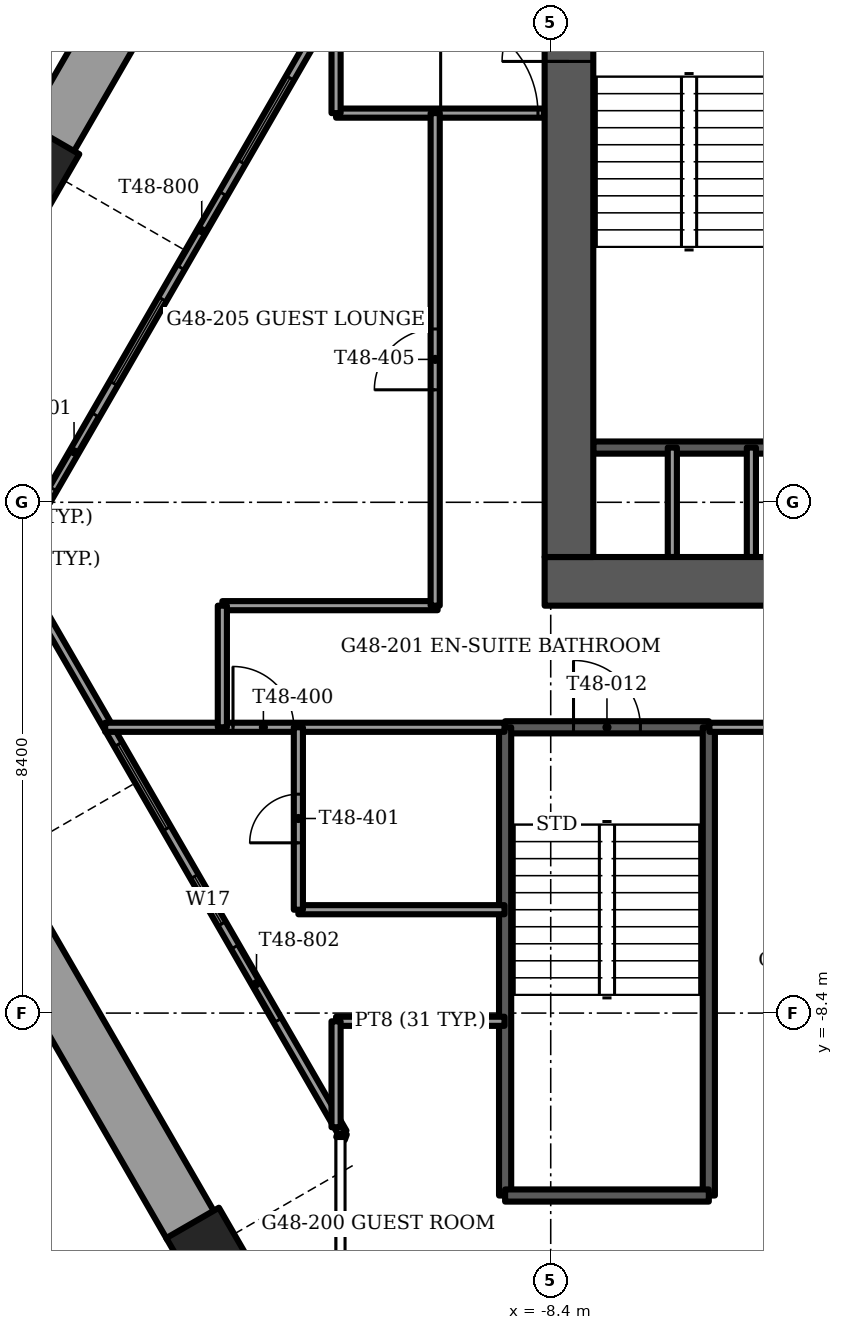
"""IFC4 building model, lengths in metres.
Left out: names, types, materials, properties, quantities, classifications, styles, units other than length and angle.
Written with IfcOpenShell. Run it as: python <this file> out.ifc"""

import sys

from ifc_helpers import new_model, si_unit, direction, frame, frame_2d, origin, origin_2d, place, context, subcontext, project, spatial, rectangle, extrude, element, fill, save


model = new_model("IFC4")
c1 = context("Model", 3, precision=1e-05, world=origin(), true_north=direction((0.0, 1.0)))
c2 = subcontext(c1, "Body", "Model", "MODEL_VIEW")
j1 = project(units=[si_unit("LENGTHUNIT", "METRE"), si_unit("PLANEANGLEUNIT", "RADIAN")], contexts=[c1])
p1 = place(None, origin())
s1 = spatial("IfcSite", under=j1, at=p1, CompositionType="ELEMENT")
p2 = place(p1, origin())
s2 = spatial("IfcBuilding", under=s1, at=p2, CompositionType="ELEMENT")
p3 = place(p2, frame((0.0, 0.0, 194.5)))
s3 = spatial("IfcBuildingStorey", under=s2, at=p3, CompositionType="ELEMENT", Elevation=194.5)
for number, where, z_axis, x_axis in (
    (1, (-16.835, 5.542, -1.2), (0.0, 0.0, 1.0), (0.5, 0.866, 0.0)),
    (2, (-14.039, -12.283, -1.2), (0.0, 0.0, 1.0), (-0.5, 0.866, 0.0)),
):
    element("IfcColumn", number, at=place(p3, frame(where, z_axis=z_axis, x_axis=x_axis)), inside=s3, PredefinedType="COLUMN", context=c2, shape_type="SweptSolid", body=[
        extrude(rectangle(XDim=1.0, YDim=1.0, at=origin_2d()), origin(), (0.0, 0.0, 1.0), 3.75),
    ])
p4 = place(p3, frame((-8.5, -1.3, -0.3), z_axis=(0.0, 0.0, 1.0), x_axis=(1.0, 0.0, 0.0)))
e3 = element("IfcWall", 3, at=p4, inside=s3, PredefinedType="SHEAR", context=c2, shape_type="SweptSolid", body=[
    extrude(rectangle(XDim=17.0, YDim=0.8, at=frame_2d((8.5, 0.0))), origin(), (0.0, 0.0, 1.0), 3.75),
])
p5 = place(p4, frame((7.7, 0.0, 0.0)))
e4 = element("IfcOpeningElement", 4, at=p5, cuts=e3, PredefinedType="OPENING", context=c2, shape_type="SweptSolid", body=[
    extrude(rectangle(XDim=1.6, YDim=2.1, at=frame_2d((0.8, 1.05))), frame((0.0, 0.4, 0.0), z_axis=(0.0, -1.0, 0.0), x_axis=(1.0, 0.0, 0.0)), (0.0, 0.0, 1.0), 0.8),
])
p6 = place(p3, frame((-8.1, -0.9, -0.3), z_axis=(0.0, 0.0, 1.0), x_axis=(0.0, 1.0, 0.0)))
e5 = element("IfcWall", 5, at=p6, inside=s3, PredefinedType="SHEAR", context=c2, shape_type="SweptSolid", body=[
    extrude(rectangle(XDim=9.8, YDim=0.8, at=frame_2d((4.9, 0.0))), origin(), (0.0, 0.0, 1.0), 3.75),
])
p7 = place(p6, frame((8.15, 0.0, 0.0)))
e6 = element("IfcOpeningElement", 6, at=p7, cuts=e5, PredefinedType="OPENING", context=c2, shape_type="SweptSolid", body=[
    extrude(rectangle(XDim=1.1, YDim=2.1, at=frame_2d((0.55, 1.05))), frame((0.0, 0.4, 0.0), z_axis=(0.0, -1.0, 0.0), x_axis=(1.0, 0.0, 0.0)), (0.0, 0.0, 1.0), 0.8),
])
for number, where, z_axis, x_axis in (
    (7, (-13.496, 11.427, 0.0), (0.0, 0.0, 1.0), (-0.5, -0.866, 0.0)),
    (8, (-17.466, -6.449, 0.0), (0.0, 0.0, 1.0), (0.5, -0.866, 0.0)),
):
    element("IfcWall", number, at=place(p3, frame(where, z_axis=z_axis, x_axis=x_axis)), inside=s3, PredefinedType="PARAPET", context=c2, shape_type="SweptSolid", body=[
        extrude(rectangle(XDim=6.296, YDim=0.9, at=frame_2d((3.148, 0.0))), origin(), (0.0, 0.0, 1.0), 1.1),
    ])
p8 = place(p3, frame((-11.824, 8.472, 0.0), z_axis=(0.0, 0.0, 1.0), x_axis=(-0.499996992154, -0.866027140358, 0.0)))
e9 = element("IfcWall", 9, at=p8, inside=s3, PredefinedType="SOLIDWALL", context=c2, shape_type="SweptSolid", body=[
    extrude(rectangle(XDim=10.264, YDim=0.15, at=frame_2d((5.132, 0.0))), origin(), (0.0, 0.0, 1.0), 3.45),
])
p9 = place(p8, frame((1.725, 0.0, 0.15)))
e10 = element("IfcOpeningElement", 10, at=p9, cuts=e9, PredefinedType="OPENING", context=c2, shape_type="SweptSolid", body=[
    extrude(rectangle(XDim=1.6, YDim=2.2, at=frame_2d((0.8, 1.1))), frame((0.0, 0.075, 0.0), z_axis=(0.0, -1.0, 0.0), x_axis=(1.0, 0.0, 0.0)), (0.0, 0.0, 1.0), 0.15),
])
p10 = place(p8, frame((3.925, 0.0, 0.0)))
e11 = element("IfcOpeningElement", 11, at=p10, cuts=e9, PredefinedType="OPENING", context=c2, shape_type="SweptSolid", body=[
    extrude(rectangle(XDim=1.4, YDim=2.4, at=frame_2d((0.7, 1.2))), frame((0.0, 0.075, 0.0), z_axis=(0.0, -1.0, 0.0), x_axis=(1.0, 0.0, 0.0)), (0.0, 0.0, 1.0), 0.15),
])
p11 = place(p8, frame((5.925, 0.0, 0.15)))
e12 = element("IfcOpeningElement", 12, at=p11, cuts=e9, PredefinedType="OPENING", context=c2, shape_type="SweptSolid", body=[
    extrude(rectangle(XDim=1.6, YDim=2.2, at=frame_2d((0.8, 1.1))), frame((0.0, 0.075, 0.0), z_axis=(0.0, -1.0, 0.0), x_axis=(1.0, 0.0, 0.0)), (0.0, 0.0, 1.0), 0.15),
])
p12 = place(p8, frame((8.125, 0.0, 0.0)))
e13 = element("IfcOpeningElement", 13, at=p12, cuts=e9, PredefinedType="OPENING", context=c2, shape_type="SweptSolid", body=[
    extrude(rectangle(XDim=1.4, YDim=2.4, at=frame_2d((0.7, 1.2))), frame((0.0, 0.075, 0.0), z_axis=(0.0, -1.0, 0.0), x_axis=(1.0, 0.0, 0.0)), (0.0, 0.0, 1.0), 0.15),
])
p13 = place(p3, frame((-16.956, -1.482, 0.0), z_axis=(0.0, 0.0, 1.0), x_axis=(0.499996992154, -0.866027140358, 0.0)))
e14 = element("IfcWall", 14, at=p13, inside=s3, PredefinedType="SOLIDWALL", context=c2, shape_type="SweptSolid", body=[
    extrude(rectangle(XDim=10.264, YDim=0.15, at=frame_2d((5.132, 0.0))), origin(), (0.0, 0.0, 1.0), 3.45),
])
p14 = place(p13, frame((2.885, 0.0, 0.15)))
e15 = element("IfcOpeningElement", 15, at=p14, cuts=e14, PredefinedType="OPENING", context=c2, shape_type="SweptSolid", body=[
    extrude(rectangle(XDim=1.6, YDim=2.2, at=frame_2d((0.8, 1.1))), frame((0.0, 0.075, 0.0), z_axis=(0.0, -1.0, 0.0), x_axis=(1.0, 0.0, 0.0)), (0.0, 0.0, 1.0), 0.15),
])
p15 = place(p13, frame((5.395, 0.0, 0.15)))
e16 = element("IfcOpeningElement", 16, at=p15, cuts=e14, PredefinedType="OPENING", context=c2, shape_type="SweptSolid", body=[
    extrude(rectangle(XDim=0.9, YDim=2.2, at=frame_2d((0.45, 1.1))), frame((0.0, 0.075, 0.0), z_axis=(0.0, -1.0, 0.0), x_axis=(1.0, 0.0, 0.0)), (0.0, 0.0, 1.0), 0.15),
])
p16 = place(p13, frame((6.73, 0.0, 0.0)))
e17 = element("IfcOpeningElement", 17, at=p16, cuts=e14, PredefinedType="OPENING", context=c2, shape_type="SweptSolid", body=[
    extrude(rectangle(XDim=1.4, YDim=2.4, at=frame_2d((0.7, 1.2))), frame((0.0, 0.075, 0.0), z_axis=(0.0, -1.0, 0.0), x_axis=(1.0, 0.0, 0.0)), (0.0, 0.0, 1.0), 0.15),
])
p17 = place(p3, frame((-11.824, -10.37, 0.0), z_axis=(0.0, 0.0, 1.0), x_axis=(-0.338543167143, -0.940950861619, 0.0)))
e18 = element("IfcWall", 18, at=p17, inside=s3, PredefinedType="SOLIDWALL", context=c2, shape_type="SweptSolid", body=[
    extrude(rectangle(XDim=0.098, YDim=0.15, at=frame_2d((0.049, 0.0))), origin(), (0.0, 0.0, 1.0), 3.45),
])
p18 = place(p3, frame((-7.7, 0.9, -0.3), z_axis=(0.0, 0.0, 1.0), x_axis=(1.0, 0.0, 0.0)))
e19 = element("IfcWall", 19, at=p18, inside=s3, PredefinedType="SOLIDWALL", context=c2, shape_type="SweptSolid", body=[
    extrude(rectangle(XDim=3.25, YDim=0.2, at=frame_2d((1.625, 0.0))), origin(), (0.0, 0.0, 1.0), 3.75),
])
for number, where, z_axis, x_axis in (
    (20, (-6.4, -0.9, 0.0), (0.0, 0.0, 1.0), (0.0, 1.0, 0.0)),
    (21, (-5.1, -0.9, 0.0), (0.0, 0.0, 1.0), (0.0, 1.0, 0.0)),
):
    element("IfcWall", number, at=place(p3, frame(where, z_axis=z_axis, x_axis=x_axis)), inside=s3, PredefinedType="PARTITIONING", context=c2, shape_type="SweptSolid", body=[
        extrude(rectangle(XDim=1.8, YDim=0.15, at=frame_2d((0.9, 0.0))), origin(), (0.0, 0.0, 1.0), 3.45),
    ])
p19 = place(p3, frame((-9.15, -3.7, -0.3), z_axis=(0.0, 0.0, 1.0), x_axis=(1.0, 0.0, 0.0)))
e22 = element("IfcWall", 22, at=p19, inside=s3, PredefinedType="SOLIDWALL", context=c2, shape_type="SweptSolid", body=[
    extrude(rectangle(XDim=3.35, YDim=0.2, at=frame_2d((1.675, 0.0))), origin(), (0.0, 0.0, 1.0), 3.75),
])
p20 = place(p19, frame((1.125, 0.0, 0.0)))
e23 = element("IfcOpeningElement", 23, at=p20, cuts=e22, PredefinedType="OPENING", context=c2, shape_type="SweptSolid", body=[
    extrude(rectangle(XDim=1.1, YDim=2.1, at=frame_2d((0.55, 1.05))), frame((0.0, 0.1, 0.0), z_axis=(0.0, -1.0, 0.0), x_axis=(1.0, 0.0, 0.0)), (0.0, 0.0, 1.0), 0.2),
])
for number, where, z_axis, x_axis in (
    (24, (-9.15, -3.7, -0.3), (0.0, 0.0, 1.0), (0.0, -1.0, 0.0)),
    (25, (-5.8, -3.7, -0.3), (0.0, 0.0, 1.0), (0.0, -1.0, 0.0)),
):
    element("IfcWall", number, at=place(p3, frame(where, z_axis=z_axis, x_axis=x_axis)), inside=s3, PredefinedType="SOLIDWALL", context=c2, shape_type="SweptSolid", body=[
        extrude(rectangle(XDim=7.7, YDim=0.2, at=frame_2d((3.85, 0.0))), origin(), (0.0, 0.0, 1.0), 3.75),
    ])
p21 = place(p3, frame((-9.15, -11.4, -0.3), z_axis=(0.0, 0.0, 1.0), x_axis=(1.0, 0.0, 0.0)))
e26 = element("IfcWall", 26, at=p21, inside=s3, PredefinedType="SOLIDWALL", context=c2, shape_type="SweptSolid", body=[
    extrude(rectangle(XDim=3.35, YDim=0.2, at=frame_2d((1.675, 0.0))), origin(), (0.0, 0.0, 1.0), 3.75),
])
p22 = place(p3, frame((-11.93, -8.535, 0.0), z_axis=(0.0, 0.0, 1.0), x_axis=(1.0, 0.0, 0.0)))
e27 = element("IfcWall", 27, at=p22, inside=s3, PredefinedType="PARTITIONING", context=c2, shape_type="SweptSolid", body=[
    extrude(rectangle(XDim=2.77, YDim=0.15, at=frame_2d((1.385, 0.0))), origin(), (0.0, 0.0, 1.0), 3.45),
])
p23 = place(p3, frame((-12.55, -6.7, 0.0), z_axis=(0.0, 0.0, 1.0), x_axis=(1.0, 0.0, 0.0)))
e28 = element("IfcWall", 28, at=p23, inside=s3, PredefinedType="PARTITIONING", context=c2, shape_type="SweptSolid", body=[
    extrude(rectangle(XDim=3.39, YDim=0.15, at=frame_2d((1.695, 0.0))), origin(), (0.0, 0.0, 1.0), 3.45),
])
p24 = place(p3, frame((-15.727, -3.7, 0.0), z_axis=(0.0, 0.0, 1.0), x_axis=(1.0, 0.0, 0.0)))
e29 = element("IfcWall", 29, at=p24, inside=s3, PredefinedType="PARTITIONING", context=c2, shape_type="SweptSolid", body=[
    extrude(rectangle(XDim=6.567, YDim=0.15, at=frame_2d((3.284, 0.0))), origin(), (0.0, 0.0, 1.0), 3.45),
])
p25 = place(p24, frame((2.102, 0.0, 0.0)))
e30 = element("IfcOpeningElement", 30, at=p25, cuts=e29, PredefinedType="OPENING", context=c2, shape_type="SweptSolid", body=[
    extrude(rectangle(XDim=1.0, YDim=2.1, at=frame_2d((0.5, 1.05))), frame((0.0, 0.075, 0.0), z_axis=(0.0, -1.0, 0.0), x_axis=(1.0, 0.0, 0.0)), (0.0, 0.0, 1.0), 0.15),
])
p26 = place(p3, frame((-5.79, -3.7, 0.0), z_axis=(0.0, 0.0, 1.0), x_axis=(1.0, 0.0, 0.0)))
e31 = element("IfcWall", 31, at=p26, inside=s3, PredefinedType="PARTITIONING", context=c2, shape_type="SweptSolid", body=[
    extrude(rectangle(XDim=4.93, YDim=0.15, at=frame_2d((2.465, 0.0))), origin(), (0.0, 0.0, 1.0), 3.45),
])
p27 = place(p3, frame((-13.8, -1.7, 0.0), z_axis=(0.0, 0.0, 1.0), x_axis=(1.0, 0.0, 0.0)))
e32 = element("IfcWall", 32, at=p27, inside=s3, PredefinedType="PARTITIONING", context=c2, shape_type="SweptSolid", body=[
    extrude(rectangle(XDim=3.54, YDim=0.15, at=frame_2d((1.77, 0.0))), origin(), (0.0, 0.0, 1.0), 3.45),
])
p28 = place(p3, frame((-11.93, 6.4, 0.0), z_axis=(0.0, 0.0, 1.0), x_axis=(1.0, 0.0, 0.0)))
e33 = element("IfcWall", 33, at=p28, inside=s3, PredefinedType="PARTITIONING", context=c2, shape_type="SweptSolid", body=[
    extrude(rectangle(XDim=3.42, YDim=0.15, at=frame_2d((1.71, 0.0))), origin(), (0.0, 0.0, 1.0), 3.45),
])
p29 = place(p28, frame((1.72, 0.0, 0.0)))
e34 = element("IfcOpeningElement", 34, at=p29, cuts=e33, PredefinedType="OPENING", context=c2, shape_type="SweptSolid", body=[
    extrude(rectangle(XDim=1.6, YDim=2.1, at=frame_2d((0.8, 1.05))), frame((0.0, 0.075, 0.0), z_axis=(0.0, -1.0, 0.0), x_axis=(1.0, 0.0, 0.0)), (0.0, 0.0, 1.0), 0.15),
])
p30 = place(p3, frame((-10.3, -1.7, 0.0), z_axis=(0.0, 0.0, 1.0), x_axis=(0.0, 1.0, 0.0)))
e35 = element("IfcWall", 35, at=p30, inside=s3, PredefinedType="PARTITIONING", context=c2, shape_type="SweptSolid", body=[
    extrude(rectangle(XDim=8.1, YDim=0.15, at=frame_2d((4.05, 0.0))), origin(), (0.0, 0.0, 1.0), 3.45),
])
p31 = place(p30, frame((3.55, 0.0, 0.0)))
e36 = element("IfcOpeningElement", 36, at=p31, cuts=e35, PredefinedType="OPENING", context=c2, shape_type="SweptSolid", body=[
    extrude(rectangle(XDim=1.0, YDim=2.1, at=frame_2d((0.5, 1.05))), frame((0.0, 0.075, 0.0), z_axis=(0.0, -1.0, 0.0), x_axis=(1.0, 0.0, 0.0)), (0.0, 0.0, 1.0), 0.15),
])
p32 = place(p3, frame((-11.93, -10.277, 0.0), z_axis=(0.0, 0.0, 1.0), x_axis=(0.0, 1.0, 0.0)))
e37 = element("IfcWall", 37, at=p32, inside=s3, PredefinedType="PARTITIONING", context=c2, shape_type="SweptSolid", body=[
    extrude(rectangle(XDim=1.742, YDim=0.15, at=frame_2d((0.871, 0.0))), origin(), (0.0, 0.0, 1.0), 3.45),
])
p33 = place(p3, frame((-11.93, 6.4, 0.0), z_axis=(0.0, 0.0, 1.0), x_axis=(0.0, 1.0, 0.0)))
e38 = element("IfcWall", 38, at=p33, inside=s3, PredefinedType="PARTITIONING", context=c2, shape_type="SweptSolid", body=[
    extrude(rectangle(XDim=1.978, YDim=0.15, at=frame_2d((0.989, 0.0))), origin(), (0.0, 0.0, 1.0), 3.45),
])
p34 = place(p3, frame((-12.55, -6.7, 0.0), z_axis=(0.0, 0.0, 1.0), x_axis=(0.0, 1.0, 0.0)))
e39 = element("IfcWall", 39, at=p34, inside=s3, PredefinedType="PARTITIONING", context=c2, shape_type="SweptSolid", body=[
    extrude(rectangle(XDim=3.0, YDim=0.15, at=frame_2d((1.5, 0.0))), origin(), (0.0, 0.0, 1.0), 3.45),
])
p35 = place(p34, frame((1.1, 0.0, 0.0)))
e40 = element("IfcOpeningElement", 40, at=p35, cuts=e39, PredefinedType="OPENING", context=c2, shape_type="SweptSolid", body=[
    extrude(rectangle(XDim=0.8, YDim=2.1, at=frame_2d((0.4, 1.05))), frame((0.0, 0.075, 0.0), z_axis=(0.0, -1.0, 0.0), x_axis=(1.0, 0.0, 0.0)), (0.0, 0.0, 1.0), 0.15),
])
p36 = place(p3, frame((-13.8, -3.7, 0.0), z_axis=(0.0, 0.0, 1.0), x_axis=(0.0, 1.0, 0.0)))
e41 = element("IfcWall", 41, at=p36, inside=s3, PredefinedType="PARTITIONING", context=c2, shape_type="SweptSolid", body=[
    extrude(rectangle(XDim=2.0, YDim=0.15, at=frame_2d((1.0, 0.0))), origin(), (0.0, 0.0, 1.0), 3.45),
])
p37 = place(p9, origin())
e42 = element("IfcWindow", 42, at=p37, inside=s3, PartitioningType="SINGLE_PANEL", PredefinedType="WINDOW", context=c2, shape_type="SweptSolid", body=[
    extrude(rectangle(XDim=1.6, YDim=2.2, at=frame_2d((0.8, 1.1))), frame((0.0, 0.03, 0.0), z_axis=(0.0, -1.0, 0.0), x_axis=(1.0, 0.0, 0.0)), (0.0, 0.0, 1.0), 0.06),
])
fill(e10, e42)
p38 = place(p10, origin())
e43 = element("IfcDoor", 43, at=p38, inside=s3, OperationType="SLIDING_TO_LEFT", PredefinedType="DOOR", context=c2, shape_type="SweptSolid", body=[
    extrude(rectangle(XDim=1.4, YDim=2.4, at=frame_2d((0.7, 1.2))), frame((0.0, 0.025, 0.0), z_axis=(0.0, -1.0, 0.0), x_axis=(1.0, 0.0, 0.0)), (0.0, 0.0, 1.0), 0.05),
])
fill(e11, e43)
p39 = place(p11, origin())
e44 = element("IfcWindow", 44, at=p39, inside=s3, PartitioningType="SINGLE_PANEL", PredefinedType="WINDOW", context=c2, shape_type="SweptSolid", body=[
    extrude(rectangle(XDim=1.6, YDim=2.2, at=frame_2d((0.8, 1.1))), frame((0.0, 0.03, 0.0), z_axis=(0.0, -1.0, 0.0), x_axis=(1.0, 0.0, 0.0)), (0.0, 0.0, 1.0), 0.06),
])
fill(e12, e44)
p40 = place(p12, origin())
e45 = element("IfcDoor", 45, at=p40, inside=s3, OperationType="SLIDING_TO_RIGHT", PredefinedType="DOOR", context=c2, shape_type="SweptSolid", body=[
    extrude(rectangle(XDim=1.4, YDim=2.4, at=frame_2d((0.7, 1.2))), frame((0.0, 0.025, 0.0), z_axis=(0.0, -1.0, 0.0), x_axis=(1.0, 0.0, 0.0)), (0.0, 0.0, 1.0), 0.05),
])
fill(e13, e45)
p41 = place(p14, origin())
e46 = element("IfcWindow", 46, at=p41, inside=s3, PartitioningType="SINGLE_PANEL", PredefinedType="WINDOW", context=c2, shape_type="SweptSolid", body=[
    extrude(rectangle(XDim=1.6, YDim=2.2, at=frame_2d((0.8, 1.1))), frame((0.0, 0.03, 0.0), z_axis=(0.0, -1.0, 0.0), x_axis=(1.0, 0.0, 0.0)), (0.0, 0.0, 1.0), 0.06),
])
fill(e15, e46)
p42 = place(p15, origin())
e47 = element("IfcWindow", 47, at=p42, inside=s3, PartitioningType="SINGLE_PANEL", PredefinedType="WINDOW", context=c2, shape_type="SweptSolid", body=[
    extrude(rectangle(XDim=0.9, YDim=2.2, at=frame_2d((0.45, 1.1))), frame((0.0, 0.03, 0.0), z_axis=(0.0, -1.0, 0.0), x_axis=(1.0, 0.0, 0.0)), (0.0, 0.0, 1.0), 0.06),
])
fill(e16, e47)
p43 = place(p16, origin())
e48 = element("IfcDoor", 48, at=p43, inside=s3, OperationType="SLIDING_TO_RIGHT", PredefinedType="DOOR", context=c2, shape_type="SweptSolid", body=[
    extrude(rectangle(XDim=1.4, YDim=2.4, at=frame_2d((0.7, 1.2))), frame((0.0, 0.025, 0.0), z_axis=(0.0, -1.0, 0.0), x_axis=(1.0, 0.0, 0.0)), (0.0, 0.0, 1.0), 0.05),
])
fill(e17, e48)
p44 = place(p7, origin())
e49 = element("IfcDoor", 49, at=p44, inside=s3, OperationType="SINGLE_SWING_RIGHT", PredefinedType="DOOR", context=c2, shape_type="SweptSolid", body=[
    extrude(rectangle(XDim=1.1, YDim=2.1, at=frame_2d((0.55, 1.05))), frame((0.0, 0.025, 0.0), z_axis=(0.0, -1.0, 0.0), x_axis=(1.0, 0.0, 0.0)), (0.0, 0.0, 1.0), 0.05),
])
fill(e6, e49)
p45 = place(p20, origin())
e50 = element("IfcDoor", 50, at=p45, inside=s3, OperationType="SINGLE_SWING_LEFT", PredefinedType="DOOR", context=c2, shape_type="SweptSolid", body=[
    extrude(rectangle(XDim=1.1, YDim=2.1, at=frame_2d((0.55, 1.05))), frame((0.0, 0.025, 0.0), z_axis=(0.0, -1.0, 0.0), x_axis=(1.0, 0.0, 0.0)), (0.0, 0.0, 1.0), 0.05),
])
fill(e23, e50)
p46 = place(p25, origin())
e51 = element("IfcDoor", 51, at=p46, inside=s3, OperationType="SINGLE_SWING_LEFT", PredefinedType="DOOR", context=c2, shape_type="SweptSolid", body=[
    extrude(rectangle(XDim=1.0, YDim=2.1, at=frame_2d((0.5, 1.05))), frame((0.0, 0.025, 0.0), z_axis=(0.0, -1.0, 0.0), x_axis=(1.0, 0.0, 0.0)), (0.0, 0.0, 1.0), 0.05),
])
fill(e30, e51)
p47 = place(p35, origin())
e52 = element("IfcDoor", 52, at=p47, inside=s3, OperationType="SINGLE_SWING_RIGHT", PredefinedType="DOOR", context=c2, shape_type="SweptSolid", body=[
    extrude(rectangle(XDim=0.8, YDim=2.1, at=frame_2d((0.4, 1.05))), frame((0.0, 0.025, 0.0), z_axis=(0.0, -1.0, 0.0), x_axis=(1.0, 0.0, 0.0)), (0.0, 0.0, 1.0), 0.05),
])
fill(e40, e52)
p48 = place(p31, origin())
e53 = element("IfcDoor", 53, at=p48, inside=s3, OperationType="SINGLE_SWING_LEFT", PredefinedType="DOOR", context=c2, shape_type="SweptSolid", body=[
    extrude(rectangle(XDim=1.0, YDim=2.1, at=frame_2d((0.5, 1.05))), frame((0.0, 0.025, 0.0), z_axis=(0.0, -1.0, 0.0), x_axis=(1.0, 0.0, 0.0)), (0.0, 0.0, 1.0), 0.05),
])
fill(e36, e53)
p49 = place(p29, origin())
e54 = element("IfcDoor", 54, at=p49, inside=s3, OperationType="DOUBLE_DOOR_SINGLE_SWING", PredefinedType="DOOR", context=c2, shape_type="SweptSolid", body=[
    extrude(rectangle(XDim=1.6, YDim=2.1, at=frame_2d((0.8, 1.05))), frame((0.0, 0.025, 0.0), z_axis=(0.0, -1.0, 0.0), x_axis=(1.0, 0.0, 0.0)), (0.0, 0.0, 1.0), 0.05),
])
fill(e34, e54)
save(model, sys.argv[1])
